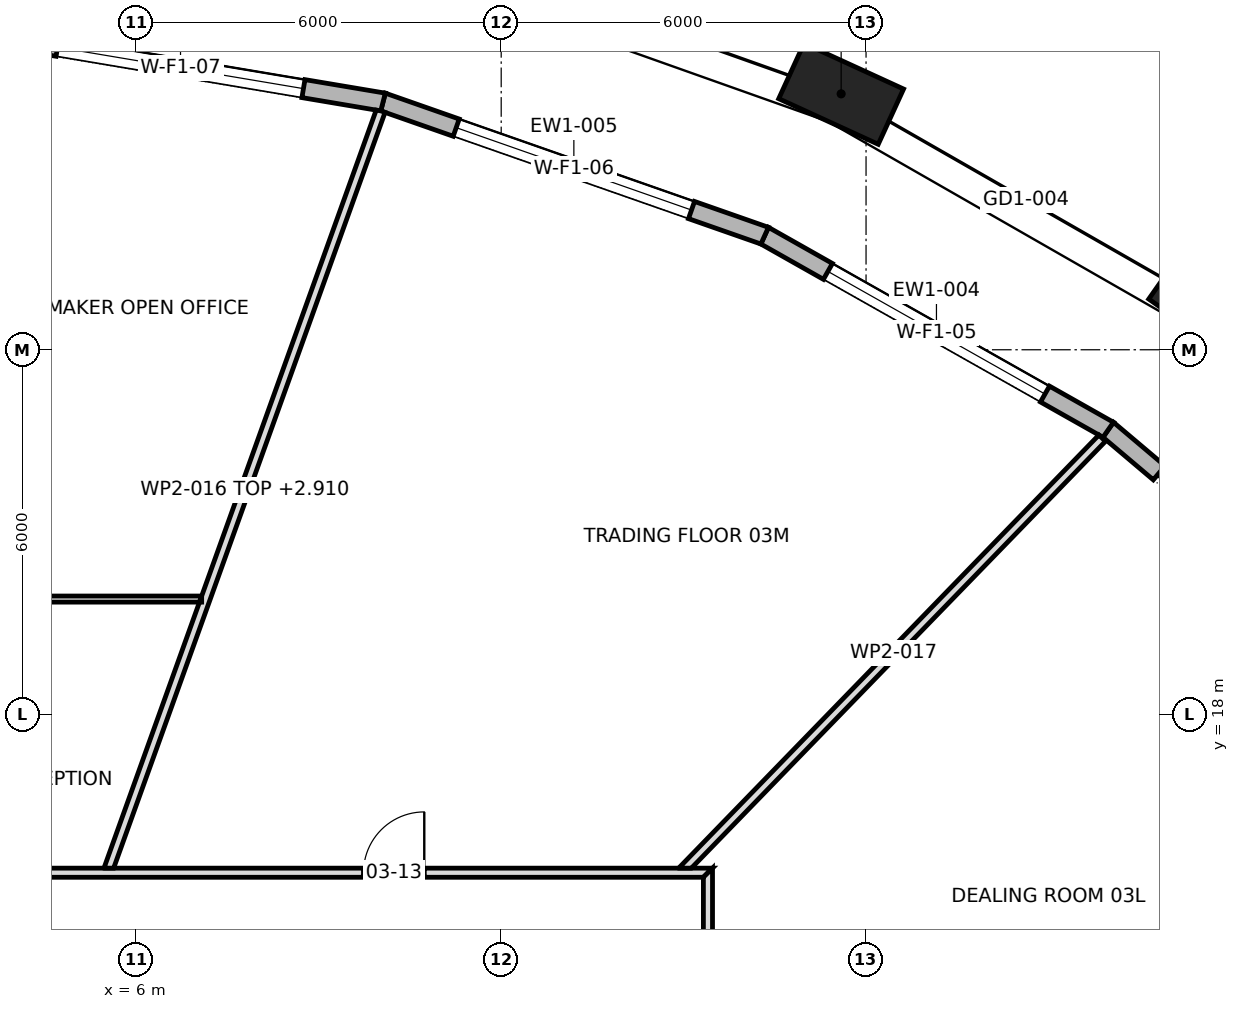
"""IFC4 building model, lengths in metres.
Left out: names, types, materials, properties, quantities, classifications, styles, units other than length and angle.
Written with IfcOpenShell. Run it as: python <this file> out.ifc"""

import sys

from ifc_helpers import new_model, si_unit, direction, frame, frame_2d, origin, origin_2d, place, context, subcontext, project, spatial, polyline, rectangle, outline, extrude, element, fill, save


model = new_model("IFC4")
c1 = context("Model", 3, precision=1e-05, world=origin(), true_north=direction((0.0, 1.0)))
c2 = subcontext(c1, "Body", "Model", "MODEL_VIEW")
j1 = project(units=[si_unit("LENGTHUNIT", "METRE"), si_unit("PLANEANGLEUNIT", "RADIAN")], contexts=[c1])
p1 = place(None, origin())
s1 = spatial("IfcSite", under=j1, at=p1, CompositionType="ELEMENT")
p2 = place(p1, origin())
s2 = spatial("IfcBuilding", under=s1, at=p2, CompositionType="ELEMENT")
p3 = place(p2, frame((0.0, 0.0, 48.7)))
s3 = spatial("IfcBuildingStorey", under=s2, at=p3, CompositionType="ELEMENT", Elevation=48.7)
for number, where, z_axis, x_axis in (
    (1, (23.673, 24.725, 0.0), (0.0, 0.0, 1.0), (-0.818, 0.575, 0.0)),
    (2, (17.591, 28.208, 0.0), (0.0, 0.0, 1.0), (-0.909, 0.417, 0.0)),
):
    element("IfcColumn", number, at=place(p3, frame(where, z_axis=z_axis, x_axis=x_axis)), inside=s3, PredefinedType="COLUMN", context=c2, shape_type="SweptSolid", body=[
        extrude(rectangle(XDim=1.8, YDim=1.0, at=origin_2d()), origin(), (0.0, 0.0, 1.0), 4.2),
    ])
p4 = place(p3, frame((26.79, 18.62, 0.0), z_axis=(0.0, 0.0, 1.0), x_axis=(-0.763614259808, 0.645672720671, 0.0)))
e3 = element("IfcWall", 3, at=p4, inside=s3, PredefinedType="STANDARD", context=c2, shape_type="SweptSolid", body=[
    extrude(outline(polyline([(-0.015, -0.15), (6.309, -0.15), (6.281, 0.15), (0.015, 0.15), (-0.015, -0.15)])), origin(), (0.0, 0.0, 1.0), 3.9),
])
p5 = place(p4, frame((1.097, 0.0, 0.0)))
e4 = element("IfcOpeningElement", 4, at=p5, cuts=e3, PredefinedType="OPENING", context=c2, shape_type="SweptSolid", body=[
    extrude(rectangle(XDim=4.1, YDim=3.45, at=frame_2d((2.05, 1.725))), frame((0.0, 0.162, 0.0), z_axis=(0.0, -1.0, 0.0), x_axis=(1.0, 0.0, 0.0)), (0.0, 0.0, 1.0), 0.324),
])
p6 = place(p3, frame((21.983, 22.684, 0.0), z_axis=(0.0, 0.0, 1.0), x_axis=(-0.870647609977, 0.491907246584, 0.0)))
e5 = element("IfcWall", 5, at=p6, inside=s3, PredefinedType="STANDARD", context=c2, shape_type="SweptSolid", body=[
    extrude(outline(polyline([(-0.014, -0.15), (6.503, -0.15), (6.476, 0.15), (0.014, 0.15), (-0.014, -0.15)])), origin(), (0.0, 0.0, 1.0), 3.9),
])
p7 = place(p6, frame((1.195, 0.0, 0.6)))
e6 = element("IfcOpeningElement", 6, at=p7, cuts=e5, PredefinedType="OPENING", context=c2, shape_type="SweptSolid", body=[
    extrude(rectangle(XDim=4.1, YDim=2.85, at=frame_2d((2.05, 1.425))), frame((0.0, 0.162, 0.0), z_axis=(0.0, -1.0, 0.0), x_axis=(1.0, 0.0, 0.0)), (0.0, 0.0, 1.0), 0.324),
])
p8 = place(p3, frame((16.333, 25.876, 0.0), z_axis=(0.0, 0.0, 1.0), x_axis=(-0.943790794479, 0.330543395421, 0.0)))
e7 = element("IfcWall", 7, at=p8, inside=s3, PredefinedType="STANDARD", context=c2, shape_type="SweptSolid", body=[
    extrude(outline(polyline([(-0.013, -0.15), (6.662, -0.15), (6.637, 0.15), (0.013, 0.15), (-0.013, -0.15)])), origin(), (0.0, 0.0, 1.0), 3.9),
])
p9 = place(p8, frame((1.275, 0.0, 0.6)))
e8 = element("IfcOpeningElement", 8, at=p9, cuts=e7, PredefinedType="OPENING", context=c2, shape_type="SweptSolid", body=[
    extrude(rectangle(XDim=4.1, YDim=2.85, at=frame_2d((2.05, 1.425))), frame((0.0, 0.162, 0.0), z_axis=(0.0, -1.0, 0.0), x_axis=(1.0, 0.0, 0.0)), (0.0, 0.0, 1.0), 0.324),
])
p10 = place(p3, frame((10.057, 28.074, 0.0), z_axis=(0.0, 0.0, 1.0), x_axis=(-0.986149614624, 0.165858185139, 0.0)))
e9 = element("IfcWall", 9, at=p10, inside=s3, PredefinedType="STANDARD", context=c2, shape_type="SweptSolid", body=[
    extrude(outline(polyline([(-0.013, -0.15), (6.767, -0.15), (6.742, 0.15), (0.013, 0.15), (-0.013, -0.15)])), origin(), (0.0, 0.0, 1.0), 3.9),
])
p11 = place(p10, frame((1.327, 0.0, 0.6)))
e10 = element("IfcOpeningElement", 10, at=p11, cuts=e9, PredefinedType="OPENING", context=c2, shape_type="SweptSolid", body=[
    extrude(rectangle(XDim=4.1, YDim=2.85, at=frame_2d((2.05, 1.425))), frame((0.0, 0.162, 0.0), z_axis=(0.0, -1.0, 0.0), x_axis=(1.0, 0.0, 0.0)), (0.0, 0.0, 1.0), 0.324),
])
p12 = place(p3, frame((-15.475, 15.4, 0.0), z_axis=(0.0, 0.0, 1.0), x_axis=(1.0, 0.0, 0.0)))
e11 = element("IfcWall", 11, at=p12, inside=s3, PredefinedType="PARTITIONING", context=c2, shape_type="SweptSolid", body=[
    extrude(outline(polyline([(0.15, -0.075), (2.066, -0.075), (3.981, -0.075), (5.897, -0.075), (7.812, -0.075), (9.728, -0.075), (11.644, -0.075), (13.56, -0.075), (15.475, -0.075), (17.391, -0.075), (19.306, -0.075), (21.222, -0.075), (23.138, -0.075), (25.053, -0.075), (26.969, -0.075), (28.885, -0.075), (30.8, -0.075), (30.95, 0.075), (29.016, 0.075), (27.081, 0.075), (25.147, 0.075), (23.212, 0.075), (21.278, 0.075), (19.344, 0.075), (17.409, 0.075), (15.475, 0.075), (13.541, 0.075), (11.606, 0.075), (9.672, 0.075), (7.738, 0.075), (5.803, 0.075), (3.869, 0.075), (1.935, 0.075), (0.0, 0.075), (0.15, -0.075)])), origin(), (0.0, 0.0, 1.0), 3.9),
])
p13 = place(p12, frame((16.84, 0.0, 0.0)))
e12 = element("IfcOpeningElement", 12, at=p13, cuts=e11, PredefinedType="OPENING", context=c2, shape_type="SweptSolid", body=[
    extrude(rectangle(XDim=1.0, YDim=2.1, at=frame_2d((0.5, 1.05))), frame((0.0, 0.087, 0.0), z_axis=(0.0, -1.0, 0.0), x_axis=(1.0, 0.0, 0.0)), (0.0, 0.0, 1.0), 0.174),
])
p14 = place(p12, frame((9.215, 0.0, 0.0)))
e13 = element("IfcOpeningElement", 13, at=p14, cuts=e11, PredefinedType="OPENING", context=c2, shape_type="SweptSolid", body=[
    extrude(rectangle(XDim=1.0, YDim=2.1, at=frame_2d((0.5, 1.05))), frame((0.0, 0.087, 0.0), z_axis=(0.0, -1.0, 0.0), x_axis=(1.0, 0.0, 0.0)), (0.0, 0.0, 1.0), 0.174),
])
p15 = place(p12, frame((25.21, 0.0, 0.0)))
e14 = element("IfcOpeningElement", 14, at=p15, cuts=e11, PredefinedType="OPENING", context=c2, shape_type="SweptSolid", body=[
    extrude(rectangle(XDim=1.0, YDim=2.1, at=frame_2d((0.5, 1.05))), frame((0.0, 0.087, 0.0), z_axis=(0.0, -1.0, 0.0), x_axis=(1.0, 0.0, 0.0)), (0.0, 0.0, 1.0), 0.174),
])
p16 = place(p3, frame((-2.247, 19.9, 0.0), z_axis=(0.0, 0.0, 1.0), x_axis=(1.0, 0.0, 0.0)))
e15 = element("IfcWall", 15, at=p16, inside=s3, PredefinedType="PARTITIONING", context=c2, shape_type="SweptSolid", body=[
    extrude(outline(polyline([(0.012, -0.05), (1.866, -0.05), (3.721, -0.05), (5.576, -0.05), (7.43, -0.05), (9.285, -0.05), (9.321, 0.049), (9.321, 0.05), (7.457, 0.05), (5.592, 0.05), (3.728, 0.05), (1.864, 0.05), (0.0, 0.05), (0.012, -0.05)])), origin(), (0.0, 0.0, 1.0), 3.9),
])
p17 = place(p16, frame((4.207, 0.0, 0.0)))
e16 = element("IfcOpeningElement", 16, at=p17, cuts=e15, PredefinedType="OPENING", context=c2, shape_type="SweptSolid", body=[
    extrude(rectangle(XDim=0.9, YDim=2.1, at=frame_2d((0.45, 1.05))), frame((0.0, 0.062, 0.0), z_axis=(0.0, -1.0, 0.0), x_axis=(1.0, 0.0, 0.0)), (0.0, 0.0, 1.0), 0.124),
])
p18 = place(p3, frame((5.538, 15.45, 0.0), z_axis=(0.0, 0.0, 1.0), x_axis=(0.337991057854, 0.941149321208, 0.0)))
e17 = element("IfcWall", 17, at=p18, inside=s3, PredefinedType="PARTITIONING", context=c2, shape_type="SweptSolid", body=[
    extrude(outline(polyline([(13.259, -0.075), (13.259, -0.041), (13.259, -0.0), (13.245, 0.075), (11.547, 0.075), (9.849, 0.075), (8.15, 0.075), (6.452, 0.075), (4.754, 0.075), (4.66, 0.042), (4.648, 0.075), (3.099, 0.075), (1.549, 0.075), (0.0, 0.075), (0.0, 0.074), (0.053, -0.075), (1.94, -0.075), (3.826, -0.075), (5.713, -0.075), (7.6, -0.075), (9.486, -0.075), (11.373, -0.075), (13.259, -0.075)])), origin(), (0.0, 0.0, 1.0), 2.91),
])
p19 = place(p3, frame((14.972, 15.423, 0.0), z_axis=(0.0, 0.0, 1.0), x_axis=(0.696324469813, 0.717727129722, 0.0)))
e18 = element("IfcWall", 18, at=p19, inside=s3, PredefinedType="PARTITIONING", context=c2, shape_type="SweptSolid", body=[
    extrude(outline(polyline([(0.0, 0.075), (0.0, 0.074), (0.145, -0.075), (2.101, -0.075), (4.057, -0.075), (6.012, -0.075), (7.968, -0.075), (9.924, -0.075), (9.924, 0.075), (7.939, 0.075), (5.954, 0.075), (3.97, 0.075), (1.985, 0.075), (0.0, 0.075)])), origin(), (0.0, 0.0, 1.0), 3.9),
])
p20 = place(p3, frame((15.4, -15.475, 0.0), z_axis=(0.0, 0.0, 1.0), x_axis=(0.0, 1.0, 0.0)))
e19 = element("IfcWall", 19, at=p20, inside=s3, PredefinedType="PARTITIONING", context=c2, shape_type="SweptSolid", body=[
    extrude(outline(polyline([(0.0, -0.075), (1.935, -0.075), (3.869, -0.075), (5.803, -0.075), (7.738, -0.075), (9.672, -0.075), (11.606, -0.075), (13.541, -0.075), (15.475, -0.075), (17.409, -0.075), (19.344, -0.075), (21.278, -0.075), (23.212, -0.075), (25.147, -0.075), (27.081, -0.075), (29.016, -0.075), (30.95, -0.075), (30.8, 0.075), (28.885, 0.075), (26.969, 0.075), (25.053, 0.075), (23.138, 0.075), (21.222, 0.075), (19.306, 0.075), (17.391, 0.075), (15.475, 0.075), (13.56, 0.075), (11.644, 0.075), (9.728, 0.075), (7.812, 0.075), (5.897, 0.075), (3.981, 0.075), (2.066, 0.075), (0.15, 0.075), (0.0, -0.075)])), origin(), (0.0, 0.0, 1.0), 3.9),
])
p21 = place(p20, frame((8.99, 0.0, 0.0)))
e20 = element("IfcOpeningElement", 20, at=p21, cuts=e19, PredefinedType="OPENING", context=c2, shape_type="SweptSolid", body=[
    extrude(rectangle(XDim=1.0, YDim=2.1, at=frame_2d((0.5, 1.05))), frame((0.0, 0.087, 0.0), z_axis=(0.0, -1.0, 0.0), x_axis=(1.0, 0.0, 0.0)), (0.0, 0.0, 1.0), 0.174),
])
p22 = place(p20, frame((17.815, 0.0, 0.0)))
e21 = element("IfcOpeningElement", 21, at=p22, cuts=e19, PredefinedType="OPENING", context=c2, shape_type="SweptSolid", body=[
    extrude(rectangle(XDim=1.0, YDim=2.1, at=frame_2d((0.5, 1.05))), frame((0.0, 0.087, 0.0), z_axis=(0.0, -1.0, 0.0), x_axis=(1.0, 0.0, 0.0)), (0.0, 0.0, 1.0), 0.174),
])
p23 = place(p20, frame((26.155, 0.0, 0.0)))
e22 = element("IfcOpeningElement", 22, at=p23, cuts=e19, PredefinedType="OPENING", context=c2, shape_type="SweptSolid", body=[
    extrude(rectangle(XDim=1.0, YDim=2.1, at=frame_2d((0.5, 1.05))), frame((0.0, 0.087, 0.0), z_axis=(0.0, -1.0, 0.0), x_axis=(1.0, 0.0, 0.0)), (0.0, 0.0, 1.0), 0.174),
])
p24 = place(p5, origin())
e23 = element("IfcDoor", 23, at=p24, inside=s3, OperationType="DOUBLE_DOOR_SLIDING", PredefinedType="DOOR", context=c2, shape_type="SweptSolid", body=[
    extrude(rectangle(XDim=4.1, YDim=3.45, at=frame_2d((2.05, 1.725))), frame((0.0, 0.025, 0.0), z_axis=(0.0, -1.0, 0.0), x_axis=(1.0, 0.0, 0.0)), (0.0, 0.0, 1.0), 0.05),
])
fill(e4, e23)
p25 = place(p7, origin())
e24 = element("IfcWindow", 24, at=p25, inside=s3, PartitioningType="TRIPLE_PANEL_VERTICAL", PredefinedType="WINDOW", context=c2, shape_type="SweptSolid", body=[
    extrude(rectangle(XDim=4.1, YDim=2.85, at=frame_2d((2.05, 1.425))), frame((0.0, 0.03, 0.0), z_axis=(0.0, -1.0, 0.0), x_axis=(1.0, 0.0, 0.0)), (0.0, 0.0, 1.0), 0.06),
])
fill(e6, e24)
p26 = place(p9, origin())
e25 = element("IfcWindow", 25, at=p26, inside=s3, PartitioningType="TRIPLE_PANEL_VERTICAL", PredefinedType="WINDOW", context=c2, shape_type="SweptSolid", body=[
    extrude(rectangle(XDim=4.1, YDim=2.85, at=frame_2d((2.05, 1.425))), frame((0.0, 0.03, 0.0), z_axis=(0.0, -1.0, 0.0), x_axis=(1.0, 0.0, 0.0)), (0.0, 0.0, 1.0), 0.06),
])
fill(e8, e25)
p27 = place(p11, origin())
e26 = element("IfcWindow", 26, at=p27, inside=s3, PartitioningType="TRIPLE_PANEL_VERTICAL", PredefinedType="WINDOW", context=c2, shape_type="SweptSolid", body=[
    extrude(rectangle(XDim=4.1, YDim=2.85, at=frame_2d((2.05, 1.425))), frame((0.0, 0.03, 0.0), z_axis=(0.0, -1.0, 0.0), x_axis=(1.0, 0.0, 0.0)), (0.0, 0.0, 1.0), 0.06),
])
fill(e10, e26)
p28 = place(p15, origin())
e27 = element("IfcDoor", 27, at=p28, inside=s3, OperationType="SINGLE_SWING_LEFT", PredefinedType="DOOR", context=c2, shape_type="SweptSolid", body=[
    extrude(rectangle(XDim=1.0, YDim=2.1, at=frame_2d((0.5, 1.05))), frame((0.0, 0.025, 0.0), z_axis=(0.0, -1.0, 0.0), x_axis=(1.0, 0.0, 0.0)), (0.0, 0.0, 1.0), 0.05),
])
fill(e14, e27)
save(model, sys.argv[1])
